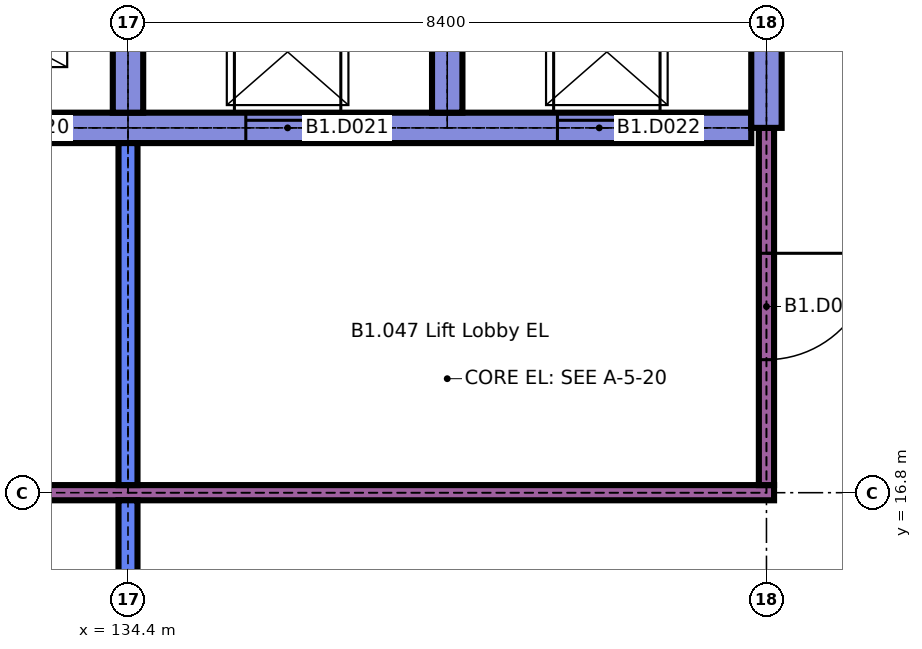
"""IFC4 building model, lengths in metres.
Left out: names, types, materials, properties, quantities, classifications, styles, units other than length and angle.
Written with IfcOpenShell. Run it as: python <this file> out.ifc"""

import sys

from ifc_helpers import new_model, si_unit, direction, frame, frame_2d, origin, place, context, subcontext, project, spatial, rectangle, extrude, element, fill, save


model = new_model("IFC4")
c1 = context("Model", 3, precision=1e-05, world=origin(), true_north=direction((0.0, 1.0)))
c2 = subcontext(c1, "Body", "Model", "MODEL_VIEW")
j1 = project(units=[si_unit("LENGTHUNIT", "METRE"), si_unit("PLANEANGLEUNIT", "RADIAN")], contexts=[c1])
p1 = place(None, origin())
s1 = spatial("IfcSite", under=j1, at=p1, CompositionType="ELEMENT")
p2 = place(p1, origin())
s2 = spatial("IfcBuilding", under=s1, at=p2, CompositionType="ELEMENT")
p3 = place(p2, frame((0.0, 0.0, -4.2)))
s3 = spatial("IfcBuildingStorey", under=s2, at=p3, CompositionType="ELEMENT", Elevation=-4.2)
p4 = place(p3, frame((117.5, 16.8, 0.0), z_axis=(0.0, 0.0, 1.0), x_axis=(1.0, 0.0, 0.0)))
e1 = element("IfcWall", 1, at=p4, inside=s3, PredefinedType="PARTITIONING", context=c2, shape_type="SweptSolid", body=[
    extrude(rectangle(XDim=25.4, YDim=0.2, at=frame_2d((12.7, 0.0))), origin(), (0.0, 0.0, 1.0), 3.75),
])
p5 = place(p4, frame((3.6, 0.0, 0.0)))
e2 = element("IfcOpeningElement", 2, at=p5, cuts=e1, PredefinedType="OPENING", context=c2, shape_type="SweptSolid", body=[
    extrude(rectangle(XDim=1.4, YDim=2.1, at=frame_2d((0.7, 1.05))), frame((0.0, 0.11, 0.0), z_axis=(0.0, -1.0, 0.0), x_axis=(1.0, 0.0, 0.0)), (0.0, 0.0, 1.0), 0.22),
])
p6 = place(p4, frame((12.0, 0.0, 0.0)))
e3 = element("IfcOpeningElement", 3, at=p6, cuts=e1, PredefinedType="OPENING", context=c2, shape_type="SweptSolid", body=[
    extrude(rectangle(XDim=1.4, YDim=2.1, at=frame_2d((0.7, 1.05))), frame((0.0, 0.11, 0.0), z_axis=(0.0, -1.0, 0.0), x_axis=(1.0, 0.0, 0.0)), (0.0, 0.0, 1.0), 0.22),
])
p7 = place(p3, frame((117.8, 21.6, 0.0), z_axis=(0.0, 0.0, 1.0), x_axis=(1.0, 0.0, 0.0)))
e4 = element("IfcWall", 4, at=p7, inside=s3, PredefinedType="SHEAR", context=c2, shape_type="SweptSolid", body=[
    extrude(rectangle(XDim=24.8, YDim=0.4, at=frame_2d((12.4, 0.0))), origin(), (0.0, 0.0, 1.0), 3.75),
])
p8 = place(p7, frame((1.45, 0.0, 0.0)))
e5 = element("IfcOpeningElement", 5, at=p8, cuts=e4, PredefinedType="OPENING", context=c2, shape_type="SweptSolid", body=[
    extrude(rectangle(XDim=1.1, YDim=2.1, at=frame_2d((0.55, 1.05))), frame((0.0, 0.21, 0.0), z_axis=(0.0, -1.0, 0.0), x_axis=(1.0, 0.0, 0.0)), (0.0, 0.0, 1.0), 0.42),
])
p9 = place(p7, frame((5.55, 0.0, 0.0)))
e6 = element("IfcOpeningElement", 6, at=p9, cuts=e4, PredefinedType="OPENING", context=c2, shape_type="SweptSolid", body=[
    extrude(rectangle(XDim=1.1, YDim=2.1, at=frame_2d((0.55, 1.05))), frame((0.0, 0.21, 0.0), z_axis=(0.0, -1.0, 0.0), x_axis=(1.0, 0.0, 0.0)), (0.0, 0.0, 1.0), 0.42),
])
p10 = place(p7, frame((9.75, 0.0, 0.0)))
e7 = element("IfcOpeningElement", 7, at=p10, cuts=e4, PredefinedType="OPENING", context=c2, shape_type="SweptSolid", body=[
    extrude(rectangle(XDim=1.1, YDim=2.1, at=frame_2d((0.55, 1.05))), frame((0.0, 0.21, 0.0), z_axis=(0.0, -1.0, 0.0), x_axis=(1.0, 0.0, 0.0)), (0.0, 0.0, 1.0), 0.42),
])
p11 = place(p7, frame((13.95, 0.0, 0.0)))
e8 = element("IfcOpeningElement", 8, at=p11, cuts=e4, PredefinedType="OPENING", context=c2, shape_type="SweptSolid", body=[
    extrude(rectangle(XDim=1.1, YDim=2.1, at=frame_2d((0.55, 1.05))), frame((0.0, 0.21, 0.0), z_axis=(0.0, -1.0, 0.0), x_axis=(1.0, 0.0, 0.0)), (0.0, 0.0, 1.0), 0.42),
])
p12 = place(p7, frame((18.15, 0.0, 0.0)))
e9 = element("IfcOpeningElement", 9, at=p12, cuts=e4, PredefinedType="OPENING", context=c2, shape_type="SweptSolid", body=[
    extrude(rectangle(XDim=1.1, YDim=2.1, at=frame_2d((0.55, 1.05))), frame((0.0, 0.21, 0.0), z_axis=(0.0, -1.0, 0.0), x_axis=(1.0, 0.0, 0.0)), (0.0, 0.0, 1.0), 0.42),
])
p13 = place(p7, frame((22.25, 0.0, 0.0)))
e10 = element("IfcOpeningElement", 10, at=p13, cuts=e4, PredefinedType="OPENING", context=c2, shape_type="SweptSolid", body=[
    extrude(rectangle(XDim=1.1, YDim=2.1, at=frame_2d((0.55, 1.05))), frame((0.0, 0.21, 0.0), z_axis=(0.0, -1.0, 0.0), x_axis=(1.0, 0.0, 0.0)), (0.0, 0.0, 1.0), 0.42),
])
p14 = place(p3, frame((134.4, 8.85, 0.0), z_axis=(0.0, 0.0, 1.0), x_axis=(0.0, 1.0, 0.0)))
e11 = element("IfcWall", 11, at=p14, inside=s3, PredefinedType="SOLIDWALL", context=c2, shape_type="SweptSolid", body=[
    extrude(rectangle(XDim=7.85, YDim=0.25, at=frame_2d((3.925, 0.0))), origin(), (0.0, 0.0, 1.0), 3.75),
])
p15 = place(p14, frame((0.3, 0.0, 0.0)))
e12 = element("IfcOpeningElement", 12, at=p15, cuts=e11, PredefinedType="OPENING", context=c2, shape_type="SweptSolid", body=[
    extrude(rectangle(XDim=6.0, YDim=2.5, at=frame_2d((3.0, 1.25))), frame((0.0, 0.135, 0.0), z_axis=(0.0, -1.0, 0.0), x_axis=(1.0, 0.0, 0.0)), (0.0, 0.0, 1.0), 0.27),
])
p16 = place(p3, frame((134.4, 16.9, 0.0), z_axis=(0.0, 0.0, 1.0), x_axis=(0.0, 1.0, 0.0)))
e13 = element("IfcWall", 13, at=p16, inside=s3, PredefinedType="SOLIDWALL", context=c2, shape_type="SweptSolid", body=[
    extrude(rectangle(XDim=4.5, YDim=0.25, at=frame_2d((2.25, 0.0))), origin(), (0.0, 0.0, 1.0), 3.75),
])
for number, where, z_axis, x_axis in (
    (14, (134.4, 21.8, 0.0), (0.0, 0.0, 1.0), (0.0, 1.0, 0.0)),
    (15, (138.6, 21.8, 0.0), (0.0, 0.0, 1.0), (0.0, 1.0, 0.0)),
):
    element("IfcWall", number, at=place(p3, frame(where, z_axis=z_axis, x_axis=x_axis)), inside=s3, PredefinedType="SHEAR", context=c2, shape_type="SweptSolid", body=[
        extrude(rectangle(XDim=3.2, YDim=0.4, at=frame_2d((1.6, 0.0))), origin(), (0.0, 0.0, 1.0), 3.75),
    ])
p17 = place(p3, frame((142.8, 16.9, 0.0), z_axis=(0.0, 0.0, 1.0), x_axis=(0.0, 1.0, 0.0)))
e16 = element("IfcWall", 16, at=p17, inside=s3, PredefinedType="PARTITIONING", context=c2, shape_type="SweptSolid", body=[
    extrude(rectangle(XDim=4.7, YDim=0.2, at=frame_2d((2.35, 0.0))), origin(), (0.0, 0.0, 1.0), 3.75),
])
p18 = place(p17, frame((1.65, 0.0, 0.0)))
e17 = element("IfcOpeningElement", 17, at=p18, cuts=e16, PredefinedType="OPENING", context=c2, shape_type="SweptSolid", body=[
    extrude(rectangle(XDim=1.4, YDim=2.1, at=frame_2d((0.7, 1.05))), frame((0.0, 0.11, 0.0), z_axis=(0.0, -1.0, 0.0), x_axis=(1.0, 0.0, 0.0)), (0.0, 0.0, 1.0), 0.22),
])
p19 = place(p3, frame((142.8, 21.6, 0.0), z_axis=(0.0, 0.0, 1.0), x_axis=(0.0, 1.0, 0.0)))
e18 = element("IfcWall", 18, at=p19, inside=s3, PredefinedType="SHEAR", context=c2, shape_type="SweptSolid", body=[
    extrude(rectangle(XDim=3.6, YDim=0.4, at=frame_2d((1.8, 0.0))), origin(), (0.0, 0.0, 1.0), 3.75),
])
p20 = place(p12, origin())
e19 = element("IfcDoor", 19, at=p20, inside=s3, OperationType="SLIDING_TO_LEFT", PredefinedType="DOOR", context=c2, shape_type="SweptSolid", body=[
    extrude(rectangle(XDim=1.1, YDim=2.1, at=frame_2d((0.55, 1.05))), frame((0.0, 0.025, 0.0), z_axis=(0.0, -1.0, 0.0), x_axis=(1.0, 0.0, 0.0)), (0.0, 0.0, 1.0), 0.05),
])
fill(e9, e19)
p21 = place(p13, origin())
e20 = element("IfcDoor", 20, at=p21, inside=s3, OperationType="SLIDING_TO_LEFT", PredefinedType="DOOR", context=c2, shape_type="SweptSolid", body=[
    extrude(rectangle(XDim=1.1, YDim=2.1, at=frame_2d((0.55, 1.05))), frame((0.0, 0.025, 0.0), z_axis=(0.0, -1.0, 0.0), x_axis=(1.0, 0.0, 0.0)), (0.0, 0.0, 1.0), 0.05),
])
fill(e10, e20)
p22 = place(p18, origin())
e21 = element("IfcDoor", 21, at=p22, inside=s3, OperationType="SINGLE_SWING_RIGHT", PredefinedType="DOOR", context=c2, shape_type="SweptSolid", body=[
    extrude(rectangle(XDim=1.4, YDim=2.1, at=frame_2d((0.7, 1.05))), frame((0.0, 0.025, 0.0), z_axis=(0.0, -1.0, 0.0), x_axis=(1.0, 0.0, 0.0)), (0.0, 0.0, 1.0), 0.05),
])
fill(e17, e21)
save(model, sys.argv[1])
